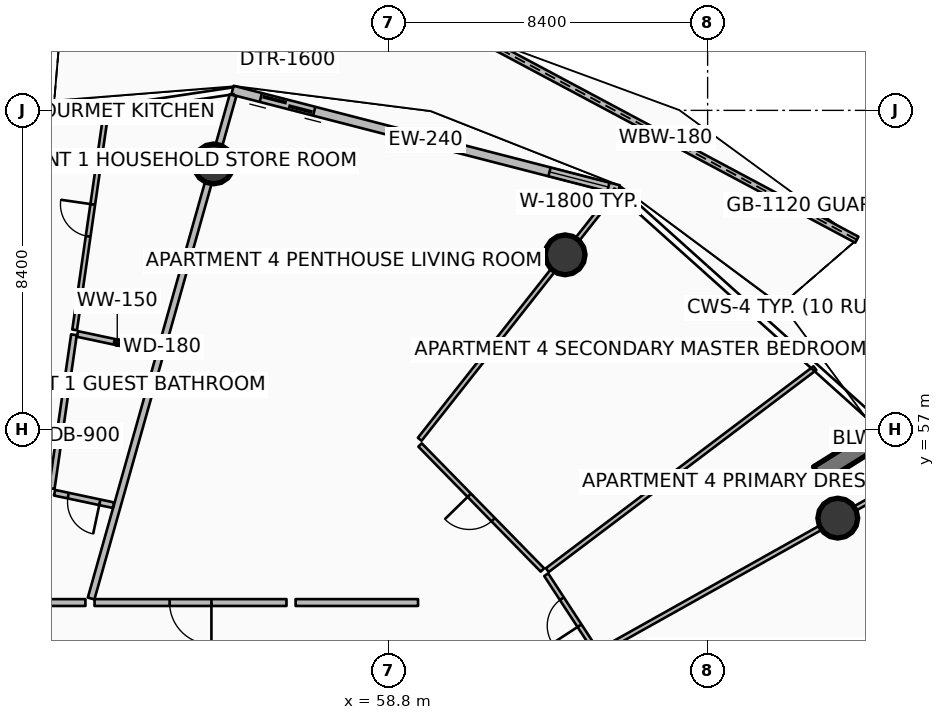
"""IFC4 building model, lengths in metres.
Left out: names, types, materials, properties, quantities, classifications, styles, units other than length and angle.
Written with IfcOpenShell. Run it as: python <this file> out.ifc"""

import sys

from ifc_helpers import new_model, si_unit, direction, frame, frame_2d, origin, origin_2d, place, context, subcontext, project, spatial, polyline, rectangle, circle, outline, extrude, element, fill, save


model = new_model("IFC4")
c1 = context("Model", 3, precision=1e-05, world=origin(), true_north=direction((0.0, 1.0)))
c2 = subcontext(c1, "Body", "Model", "MODEL_VIEW")
j1 = project(units=[si_unit("LENGTHUNIT", "METRE"), si_unit("PLANEANGLEUNIT", "RADIAN")], contexts=[c1])
p1 = place(None, origin())
s1 = spatial("IfcSite", under=j1, at=p1, CompositionType="ELEMENT")
p2 = place(p1, origin())
s2 = spatial("IfcBuilding", under=s1, at=p2, CompositionType="ELEMENT")
p3 = place(p2, frame((0.0, 0.0, 199.05)))
s3 = spatial("IfcBuildingStorey", under=s2, at=p3, CompositionType="ELEMENT", Elevation=199.05)
p4 = place(p3, frame((70.114, 55.818, 0.0), z_axis=(0.0, 0.0, 1.0), x_axis=(0.848033572426, 0.529942506352, 0.0)))
e1 = element("IfcWall", 1, at=p4, inside=s3, PredefinedType="SOLIDWALL", context=c2, shape_type="SweptSolid", body=[
    extrude(rectangle(XDim=3.5, YDim=0.48, at=frame_2d((1.75, 0.0))), origin(), (0.0, 0.0, 1.0), 3.75),
])
for number, where, z_axis, x_axis in (
    (2, (70.625, 54.671, 0.0), (0.0, 0.0, 1.0), (1.0, 0.0, 0.0)),
    (3, (63.451, 61.599, 0.0), (0.0, 0.0, 1.0), (1.0, 0.0, 0.0)),
    (4, (54.202, 63.992, 0.0), (0.0, 0.0, 1.0), (1.0, 0.0, 0.0)),
):
    element("IfcColumn", number, at=place(p3, frame(where, z_axis=z_axis, x_axis=x_axis)), inside=s3, PredefinedType="COLUMN", context=c2, shape_type="SweptSolid", body=[
        extrude(circle(Radius=0.525, at=origin_2d()), origin(), (0.0, 0.0, 1.0), 3.5),
    ])
p5 = place(p3, frame((71.126, 61.997, 0.0), z_axis=(0.0, 0.0, 1.0), x_axis=(-0.882077945567, 0.471103489632, 0.0)))
e5 = element("IfcWall", 5, at=p5, inside=s3, PredefinedType="PARAPET", context=c2, shape_type="SweptSolid", body=[
    extrude(outline(polyline([(0.0, 0.0), (11.409, 0.0), (11.409, 1.632), (5.705, 1.798), (0.0, 1.86), (0.0, 0.0)])), frame((0.0, 0.09, 0.0), z_axis=(0.0, -1.0, 0.0), x_axis=(1.0, 0.0, 0.0)), (0.0, 0.0, 1.0), 0.18),
])
p6 = place(p3, frame((64.86, 63.313, 0.0), z_axis=(0.0, 0.0, 1.0), x_axis=(-0.968374028006, 0.249502989727, 0.0)))
e6 = element("IfcWall", 6, at=p6, inside=s3, PredefinedType="SOLIDWALL", context=c2, shape_type="SweptSolid", body=[
    extrude(rectangle(XDim=10.494, YDim=0.24, at=frame_2d((5.247, 0.0))), origin(), (0.0, 0.0, 1.0), 2.45),
])
p7 = place(p6, frame((8.274, 0.0, 0.0)))
e7 = element("IfcOpeningElement", 7, at=p7, cuts=e6, PredefinedType="OPENING", context=c2, shape_type="SweptSolid", body=[
    extrude(rectangle(XDim=1.45, YDim=2.15, at=frame_2d((0.725, 1.075))), frame((0.0, 0.13, 0.0), z_axis=(0.0, -1.0, 0.0), x_axis=(1.0, 0.0, 0.0)), (0.0, 0.0, 1.0), 0.26),
])
p8 = place(p6, frame((0.28, 0.0, 0.65)))
e8 = element("IfcOpeningElement", 8, at=p8, cuts=e6, PredefinedType="OPENING", context=c2, shape_type="SweptSolid", body=[
    extrude(rectangle(XDim=1.6, YDim=1.5, at=frame_2d((0.8, 0.75))), frame((0.0, 0.13, 0.0), z_axis=(0.0, -1.0, 0.0), x_axis=(1.0, 0.0, 0.0)), (0.0, 0.0, 1.0), 0.26),
])
p9 = place(p3, frame((50.977, 52.556, 0.0), z_axis=(0.0, 0.0, 1.0), x_axis=(0.271443307373, 0.962454430548, 0.0)))
e9 = element("IfcWall", 9, at=p9, inside=s3, PredefinedType="PARTITIONING", context=c2, shape_type="SweptSolid", body=[
    extrude(rectangle(XDim=13.759, YDim=0.18, at=frame_2d((6.88, 0.0))), origin(), (0.0, 0.0, 1.0), 2.94),
])
p10 = place(p3, frame((50.827, 52.45, 0.0), z_axis=(0.0, 0.0, 1.0), x_axis=(-1.0, 0.0, 0.0)))
e10 = element("IfcWall", 10, at=p10, inside=s3, PredefinedType="PARTITIONING", context=c2, shape_type="SweptSolid", body=[
    extrude(rectangle(XDim=3.944, YDim=0.18, at=frame_2d((1.972, 0.0))), origin(), (0.0, 0.0, 1.0), 2.94),
])
p11 = place(p3, frame((51.566, 55.011, 0.0), z_axis=(0.0, 0.0, 1.0), x_axis=(-0.978219904541, 0.207571236833, 0.0)))
e11 = element("IfcWall", 11, at=p11, inside=s3, PredefinedType="PARTITIONING", context=c2, shape_type="SweptSolid", body=[
    extrude(rectangle(XDim=1.584, YDim=0.15, at=frame_2d((0.792, 0.0))), origin(), (0.0, 0.0, 1.0), 2.94),
])
p12 = place(p11, frame((0.367, 0.0, 0.0)))
e12 = element("IfcOpeningElement", 12, at=p12, cuts=e11, PredefinedType="OPENING", context=c2, shape_type="SweptSolid", body=[
    extrude(rectangle(XDim=0.85, YDim=2.06, at=frame_2d((0.425, 1.03))), frame((0.0, 0.085, 0.0), z_axis=(0.0, -1.0, 0.0), x_axis=(1.0, 0.0, 0.0)), (0.0, 0.0, 1.0), 0.17),
])
p13 = place(p3, frame((52.711, 59.073, 0.0), z_axis=(0.0, 0.0, 1.0), x_axis=(-0.978208139302, 0.207626675075, 0.0)))
e13 = element("IfcWall", 13, at=p13, inside=s3, PredefinedType="PARTITIONING", context=c2, shape_type="SweptSolid", body=[
    extrude(rectangle(XDim=2.139, YDim=0.15, at=frame_2d((1.069, 0.0))), origin(), (0.0, 0.0, 1.0), 2.94),
])
p14 = place(p3, frame((49.941, 55.448, 0.0), z_axis=(0.0, 0.0, 1.0), x_axis=(0.142850308916, 0.989744304981, 0.0)))
e14 = element("IfcWall", 14, at=p14, inside=s3, PredefinedType="PARTITIONING", context=c2, shape_type="SweptSolid", body=[
    extrude(rectangle(XDim=4.09, YDim=0.15, at=frame_2d((2.045, 0.0))), origin(), (0.0, 0.0, 1.0), 2.94),
])
p15 = place(p3, frame((50.544, 59.625, 0.0), z_axis=(0.0, 0.0, 1.0), x_axis=(0.142847588942, 0.989744697553, 0.0)))
e15 = element("IfcWall", 15, at=p15, inside=s3, PredefinedType="PARTITIONING", context=c2, shape_type="SweptSolid", body=[
    extrude(rectangle(XDim=5.823, YDim=0.125, at=frame_2d((2.912, 0.0))), origin(), (0.0, 0.0, 1.0), 2.94),
])
p16 = place(p15, frame((2.487, 0.0, 0.0)))
e16 = element("IfcOpeningElement", 16, at=p16, cuts=e15, PredefinedType="OPENING", context=c2, shape_type="SweptSolid", body=[
    extrude(rectangle(XDim=0.85, YDim=2.06, at=frame_2d((0.425, 1.03))), frame((0.0, 0.073, 0.0), z_axis=(0.0, -1.0, 0.0), x_axis=(1.0, 0.0, 0.0)), (0.0, 0.0, 1.0), 0.145),
])
p17 = place(p3, frame((56.118, 52.45, 0.0), z_axis=(0.0, 0.0, 1.0), x_axis=(-1.0, 0.0, 0.0)))
e17 = element("IfcWall", 17, at=p17, inside=s3, PredefinedType="PARTITIONING", context=c2, shape_type="SweptSolid", body=[
    extrude(rectangle(XDim=5.051, YDim=0.18, at=frame_2d((2.525, 0.0))), origin(), (0.0, 0.0, 1.0), 2.94),
])
p18 = place(p17, frame((1.975, 0.0, 0.0)))
e18 = element("IfcOpeningElement", 18, at=p18, cuts=e17, PredefinedType="OPENING", context=c2, shape_type="SweptSolid", body=[
    extrude(rectangle(XDim=1.1, YDim=2.1, at=frame_2d((0.55, 1.05))), frame((0.0, 0.1, 0.0), z_axis=(0.0, -1.0, 0.0), x_axis=(1.0, 0.0, 0.0)), (0.0, 0.0, 1.0), 0.2),
])
p19 = place(p3, frame((59.58, 52.45, 0.0), z_axis=(0.0, 0.0, 1.0), x_axis=(-1.0, 0.0, 0.0)))
e19 = element("IfcWall", 19, at=p19, inside=s3, PredefinedType="PARTITIONING", context=c2, shape_type="SweptSolid", body=[
    extrude(rectangle(XDim=3.222, YDim=0.18, at=frame_2d((1.611, 0.0))), origin(), (0.0, 0.0, 1.0), 2.94),
])
p20 = place(p3, frame((64.383, 51.175, 0.0), z_axis=(0.0, 0.0, 1.0), x_axis=(0.872496427588, 0.488620490611, 0.0)))
e20 = element("IfcWall", 20, at=p20, inside=s3, PredefinedType="PARTITIONING", context=c2, shape_type="SweptSolid", body=[
    extrude(rectangle(XDim=9.118, YDim=0.125, at=frame_2d((4.559, 0.0))), origin(), (0.0, 0.0, 1.0), 2.94),
])
p21 = place(p3, frame((59.625, 56.746, 0.0), z_axis=(0.0, 0.0, 1.0), x_axis=(0.619083134383, 0.785325456561, 0.0)))
e21 = element("IfcWall", 21, at=p21, inside=s3, PredefinedType="PARTITIONING", context=c2, shape_type="SweptSolid", body=[
    extrude(rectangle(XDim=8.353, YDim=0.125, at=frame_2d((4.177, 0.0))), origin(), (0.0, 0.0, 1.0), 2.94),
])
p22 = place(p3, frame((62.981, 53.303, 0.0), z_axis=(0.0, 0.0, 1.0), x_axis=(0.798266473747, 0.602304438711, 0.0)))
e22 = element("IfcWall", 22, at=p22, inside=s3, PredefinedType="PARTITIONING", context=c2, shape_type="SweptSolid", body=[
    extrude(rectangle(XDim=8.822, YDim=0.125, at=frame_2d((4.411, 0.0))), origin(), (0.0, 0.0, 1.0), 2.94),
])
p23 = place(p3, frame((64.241, 51.21, 0.0), z_axis=(0.0, 0.0, 1.0), x_axis=(-0.546782970229, 0.837274377649, 0.0)))
e23 = element("IfcWall", 23, at=p23, inside=s3, PredefinedType="PARTITIONING", context=c2, shape_type="SweptSolid", body=[
    extrude(rectangle(XDim=2.356, YDim=0.125, at=frame_2d((1.178, 0.0))), origin(), (0.0, 0.0, 1.0), 2.94),
])
p24 = place(p23, frame((0.753, 0.0, 0.0)))
e24 = element("IfcOpeningElement", 24, at=p24, cuts=e23, PredefinedType="OPENING", context=c2, shape_type="SweptSolid", body=[
    extrude(rectangle(XDim=0.85, YDim=2.06, at=frame_2d((0.425, 1.03))), frame((0.0, 0.073, 0.0), z_axis=(0.0, -1.0, 0.0), x_axis=(1.0, 0.0, 0.0)), (0.0, 0.0, 1.0), 0.145),
])
p25 = place(p3, frame((62.853, 53.306, 0.0), z_axis=(0.0, 0.0, 1.0), x_axis=(-0.699562743434, 0.714571177699, 0.0)))
e25 = element("IfcWall", 25, at=p25, inside=s3, PredefinedType="PARTITIONING", context=c2, shape_type="SweptSolid", body=[
    extrude(rectangle(XDim=4.604, YDim=0.125, at=frame_2d((2.302, 0.0))), origin(), (0.0, 0.0, 1.0), 2.94),
])
p26 = place(p25, frame((1.852, 0.0, 0.0)))
e26 = element("IfcOpeningElement", 26, at=p26, cuts=e25, PredefinedType="OPENING", context=c2, shape_type="SweptSolid", body=[
    extrude(rectangle(XDim=0.9, YDim=2.08, at=frame_2d((0.45, 1.04))), frame((0.0, 0.073, 0.0), z_axis=(0.0, -1.0, 0.0), x_axis=(1.0, 0.0, 0.0)), (0.0, 0.0, 1.0), 0.145),
])
p27 = place(p7, origin())
e27 = element("IfcDoor", 27, at=p27, inside=s3, OperationType="DOUBLE_DOOR_SLIDING", PredefinedType="DOOR", context=c2, shape_type="SweptSolid", body=[
    extrude(rectangle(XDim=1.45, YDim=2.15, at=frame_2d((0.725, 1.075))), frame((0.0, 0.025, 0.0), z_axis=(0.0, -1.0, 0.0), x_axis=(1.0, 0.0, 0.0)), (0.0, 0.0, 1.0), 0.05),
])
fill(e7, e27)
p28 = place(p8, origin())
e28 = element("IfcWindow", 28, at=p28, inside=s3, PartitioningType="SINGLE_PANEL", PredefinedType="WINDOW", context=c2, shape_type="SweptSolid", body=[
    extrude(rectangle(XDim=1.6, YDim=1.5, at=frame_2d((0.8, 0.75))), frame((0.0, 0.03, 0.0), z_axis=(0.0, -1.0, 0.0), x_axis=(1.0, 0.0, 0.0)), (0.0, 0.0, 1.0), 0.06),
])
fill(e8, e28)
p29 = place(p12, origin())
e29 = element("IfcDoor", 29, at=p29, inside=s3, OperationType="SINGLE_SWING_LEFT", PredefinedType="DOOR", context=c2, shape_type="SweptSolid", body=[
    extrude(rectangle(XDim=0.85, YDim=2.06, at=frame_2d((0.425, 1.03))), frame((0.0, 0.025, 0.0), z_axis=(0.0, -1.0, 0.0), x_axis=(1.0, 0.0, 0.0)), (0.0, 0.0, 1.0), 0.05),
])
fill(e12, e29)
p30 = place(p16, origin())
e30 = element("IfcDoor", 30, at=p30, inside=s3, OperationType="SINGLE_SWING_RIGHT", PredefinedType="DOOR", context=c2, shape_type="SweptSolid", body=[
    extrude(rectangle(XDim=0.85, YDim=2.06, at=frame_2d((0.425, 1.03))), frame((0.0, 0.025, 0.0), z_axis=(0.0, -1.0, 0.0), x_axis=(1.0, 0.0, 0.0)), (0.0, 0.0, 1.0), 0.05),
])
fill(e16, e30)
p31 = place(p18, origin())
e31 = element("IfcDoor", 31, at=p31, inside=s3, OperationType="SINGLE_SWING_LEFT", PredefinedType="DOOR", context=c2, shape_type="SweptSolid", body=[
    extrude(rectangle(XDim=1.1, YDim=2.1, at=frame_2d((0.55, 1.05))), frame((0.0, 0.025, 0.0), z_axis=(0.0, -1.0, 0.0), x_axis=(1.0, 0.0, 0.0)), (0.0, 0.0, 1.0), 0.05),
])
fill(e18, e31)
p32 = place(p24, origin())
e32 = element("IfcDoor", 32, at=p32, inside=s3, OperationType="SINGLE_SWING_LEFT", PredefinedType="DOOR", context=c2, shape_type="SweptSolid", body=[
    extrude(rectangle(XDim=0.85, YDim=2.06, at=frame_2d((0.425, 1.03))), frame((0.0, 0.025, 0.0), z_axis=(0.0, -1.0, 0.0), x_axis=(1.0, 0.0, 0.0)), (0.0, 0.0, 1.0), 0.05),
])
fill(e24, e32)
p33 = place(p26, origin())
e33 = element("IfcDoor", 33, at=p33, inside=s3, OperationType="SINGLE_SWING_RIGHT", PredefinedType="DOOR", context=c2, shape_type="SweptSolid", body=[
    extrude(rectangle(XDim=0.9, YDim=2.08, at=frame_2d((0.45, 1.04))), frame((0.0, 0.025, 0.0), z_axis=(0.0, -1.0, 0.0), x_axis=(1.0, 0.0, 0.0)), (0.0, 0.0, 1.0), 0.05),
])
fill(e26, e33)
save(model, sys.argv[1])
